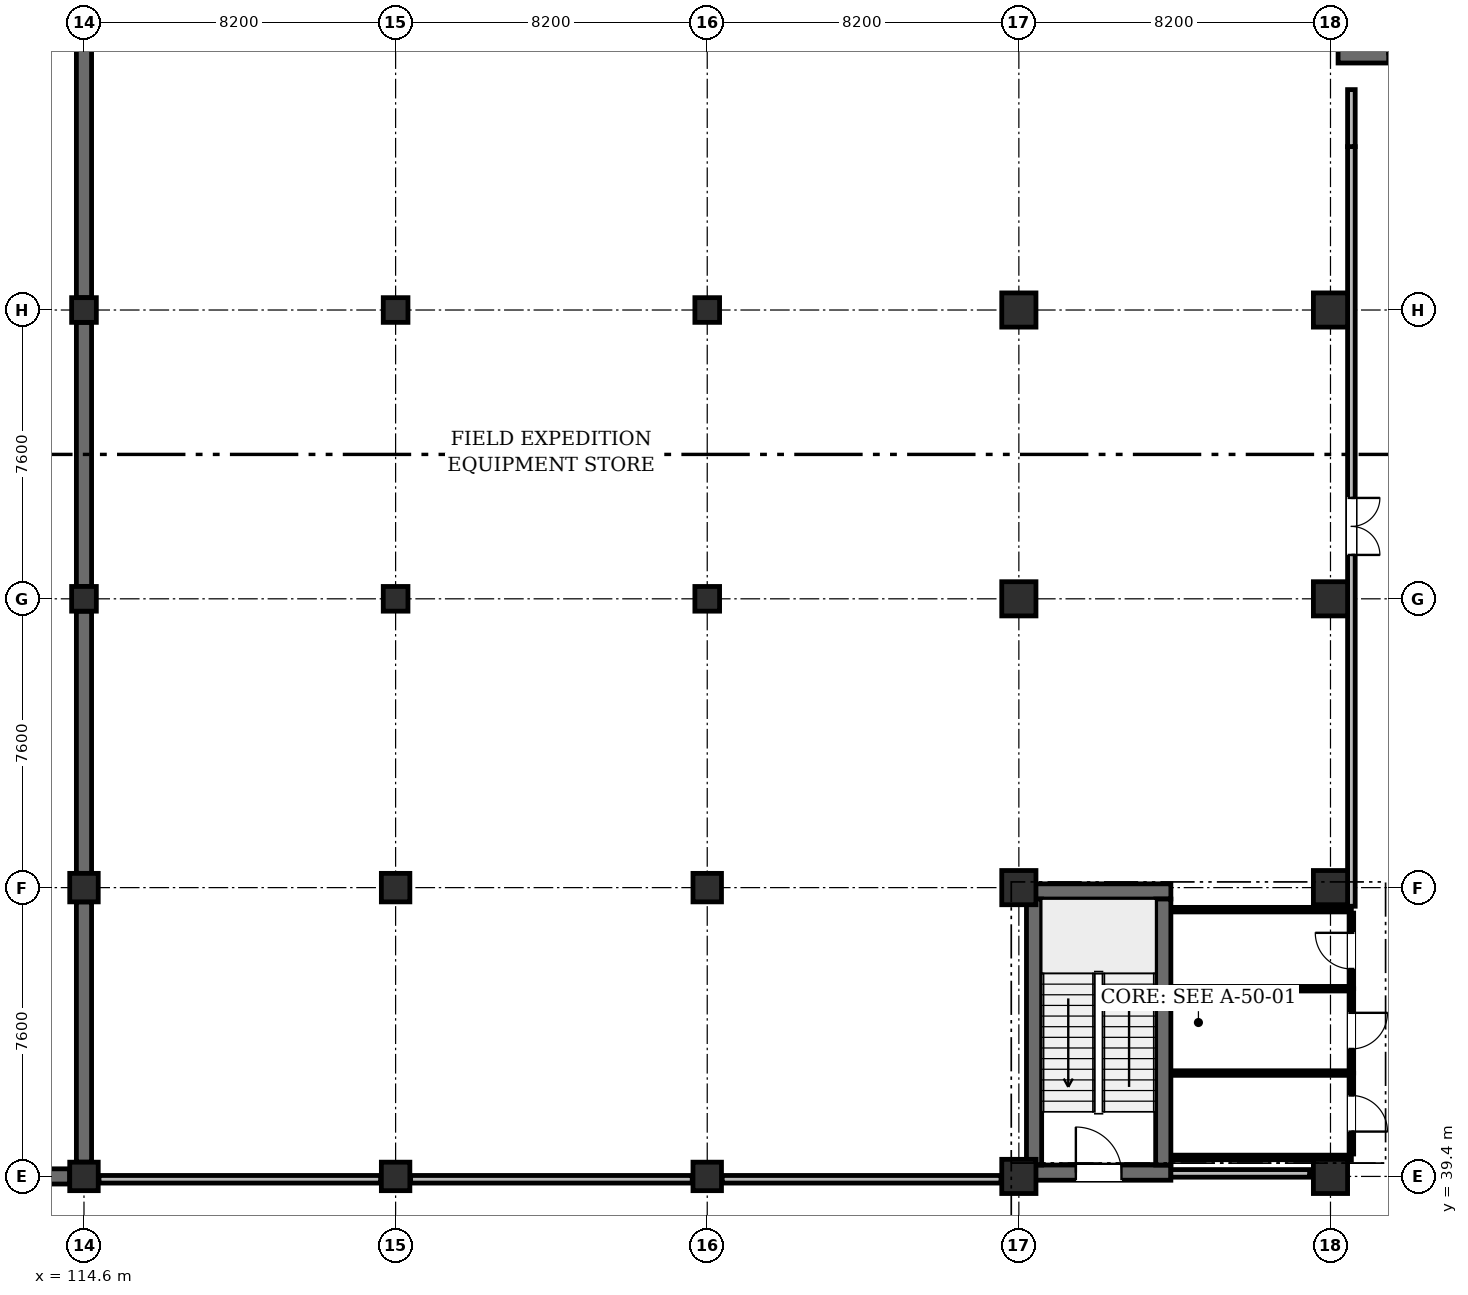
"""IFC4 building model, lengths in metres.
Left out: names, types, materials, properties, quantities, classifications, styles, units other than length and angle.
Written with IfcOpenShell. Run it as: python <this file> out.ifc"""

import sys

from ifc_helpers import new_model, si_unit, direction, frame, frame_2d, origin, origin_2d, place, context, subcontext, project, spatial, rectangle, extrude, element, fill, save


model = new_model("IFC4")
c1 = context("Model", 3, precision=1e-05, world=origin(), true_north=direction((0.0, 1.0)))
c2 = subcontext(c1, "Body", "Model", "MODEL_VIEW")
j1 = project(units=[si_unit("LENGTHUNIT", "METRE"), si_unit("PLANEANGLEUNIT", "RADIAN")], contexts=[c1])
p1 = place(None, origin())
s1 = spatial("IfcSite", under=j1, at=p1, CompositionType="ELEMENT")
p2 = place(p1, origin())
s2 = spatial("IfcBuilding", under=s1, at=p2, CompositionType="ELEMENT")
p3 = place(p2, frame((0.0, 0.0, -4.8)))
s3 = spatial("IfcBuildingStorey", under=s2, at=p3, CompositionType="ELEMENT", Elevation=-4.8)
for number, where, z_axis, x_axis in (
    (1, (114.6, 39.4, 0.0), (0.0, 0.0, 1.0), (1.0, 0.0, 0.0)),
    (2, (114.6, 47.0, 0.0), (0.0, 0.0, 1.0), (1.0, 0.0, 0.0)),
):
    element("IfcColumn", number, at=place(p3, frame(where, z_axis=z_axis, x_axis=x_axis)), inside=s3, PredefinedType="COLUMN", context=c2, shape_type="SweptSolid", body=[
        extrude(rectangle(XDim=0.75, YDim=0.75, at=origin_2d()), origin(), (0.0, 0.0, 1.0), 4.46),
    ])
for number, where, z_axis, x_axis in (
    (3, (114.6, 54.6, 0.0), (0.0, 0.0, 1.0), (1.0, 0.0, 0.0)),
    (4, (114.6, 62.2, 0.0), (0.0, 0.0, 1.0), (1.0, 0.0, 0.0)),
):
    element("IfcColumn", number, at=place(p3, frame(where, z_axis=z_axis, x_axis=x_axis)), inside=s3, PredefinedType="COLUMN", context=c2, shape_type="SweptSolid", body=[
        extrude(rectangle(XDim=0.65, YDim=0.65, at=origin_2d()), origin(), (0.0, 0.0, 1.0), 4.46),
    ])
for number, where, z_axis, x_axis in (
    (5, (122.8, 39.4, 0.0), (0.0, 0.0, 1.0), (1.0, 0.0, 0.0)),
    (6, (122.8, 47.0, 0.0), (0.0, 0.0, 1.0), (1.0, 0.0, 0.0)),
):
    element("IfcColumn", number, at=place(p3, frame(where, z_axis=z_axis, x_axis=x_axis)), inside=s3, PredefinedType="COLUMN", context=c2, shape_type="SweptSolid", body=[
        extrude(rectangle(XDim=0.75, YDim=0.75, at=origin_2d()), origin(), (0.0, 0.0, 1.0), 4.46),
    ])
for number, where, z_axis, x_axis in (
    (7, (122.8, 54.6, 0.0), (0.0, 0.0, 1.0), (1.0, 0.0, 0.0)),
    (8, (122.8, 62.2, 0.0), (0.0, 0.0, 1.0), (1.0, 0.0, 0.0)),
):
    element("IfcColumn", number, at=place(p3, frame(where, z_axis=z_axis, x_axis=x_axis)), inside=s3, PredefinedType="COLUMN", context=c2, shape_type="SweptSolid", body=[
        extrude(rectangle(XDim=0.65, YDim=0.65, at=origin_2d()), origin(), (0.0, 0.0, 1.0), 4.46),
    ])
for number, where, z_axis, x_axis in (
    (9, (131.0, 39.4, 0.0), (0.0, 0.0, 1.0), (1.0, 0.0, 0.0)),
    (10, (131.0, 47.0, 0.0), (0.0, 0.0, 1.0), (1.0, 0.0, 0.0)),
):
    element("IfcColumn", number, at=place(p3, frame(where, z_axis=z_axis, x_axis=x_axis)), inside=s3, PredefinedType="COLUMN", context=c2, shape_type="SweptSolid", body=[
        extrude(rectangle(XDim=0.75, YDim=0.75, at=origin_2d()), origin(), (0.0, 0.0, 1.0), 4.46),
    ])
for number, where, z_axis, x_axis in (
    (11, (131.0, 54.6, 0.0), (0.0, 0.0, 1.0), (1.0, 0.0, 0.0)),
    (12, (131.0, 62.2, 0.0), (0.0, 0.0, 1.0), (1.0, 0.0, 0.0)),
):
    element("IfcColumn", number, at=place(p3, frame(where, z_axis=z_axis, x_axis=x_axis)), inside=s3, PredefinedType="COLUMN", context=c2, shape_type="SweptSolid", body=[
        extrude(rectangle(XDim=0.65, YDim=0.65, at=origin_2d()), origin(), (0.0, 0.0, 1.0), 4.46),
    ])
for number, where, z_axis, x_axis in (
    (13, (139.2, 39.4, 0.0), (0.0, 0.0, 1.0), (1.0, 0.0, 0.0)),
    (14, (139.2, 47.0, 0.0), (0.0, 0.0, 1.0), (1.0, 0.0, 0.0)),
    (15, (139.2, 54.6, 0.0), (0.0, 0.0, 1.0), (1.0, 0.0, 0.0)),
    (16, (139.2, 62.2, 0.0), (0.0, 0.0, 1.0), (1.0, 0.0, 0.0)),
    (17, (147.4, 39.4, 0.0), (0.0, 0.0, 1.0), (1.0, 0.0, 0.0)),
    (18, (147.4, 47.0, 0.0), (0.0, 0.0, 1.0), (1.0, 0.0, 0.0)),
    (19, (147.4, 54.6, 0.0), (0.0, 0.0, 1.0), (1.0, 0.0, 0.0)),
    (20, (147.4, 62.2, 0.0), (0.0, 0.0, 1.0), (1.0, 0.0, 0.0)),
):
    element("IfcColumn", number, at=place(p3, frame(where, z_axis=z_axis, x_axis=x_axis)), inside=s3, PredefinedType="COLUMN", context=c2, shape_type="SweptSolid", body=[
        extrude(rectangle(XDim=0.9, YDim=0.9, at=origin_2d()), origin(), (0.0, 0.0, 1.0), 4.46),
    ])
p4 = place(p3, frame((106.725, 39.4, 0.0), z_axis=(0.0, 0.0, 1.0), x_axis=(1.0, 0.0, 0.0)))
e21 = element("IfcWall", 21, at=p4, inside=s3, PredefinedType="SOLIDWALL", context=c2, shape_type="SweptSolid", body=[
    extrude(rectangle(XDim=7.5, YDim=0.4, at=frame_2d((3.75, 0.0))), origin(), (0.0, 0.0, 1.0), 4.46),
])
p5 = place(p3, frame((114.6, 39.775, 0.0), z_axis=(0.0, 0.0, 1.0), x_axis=(0.0, 1.0, 0.0)))
e22 = element("IfcWall", 22, at=p5, inside=s3, PredefinedType="SOLIDWALL", context=c2, shape_type="SweptSolid", body=[
    extrude(rectangle(XDim=6.85, YDim=0.4, at=frame_2d((3.425, 0.0))), origin(), (0.0, 0.0, 1.0), 4.46),
])
p6 = place(p3, frame((114.6, 47.375, 0.0), z_axis=(0.0, 0.0, 1.0), x_axis=(0.0, 1.0, 0.0)))
e23 = element("IfcWall", 23, at=p6, inside=s3, PredefinedType="SOLIDWALL", context=c2, shape_type="SweptSolid", body=[
    extrude(rectangle(XDim=6.9, YDim=0.4, at=frame_2d((3.45, 0.0))), origin(), (0.0, 0.0, 1.0), 4.46),
])
p7 = place(p3, frame((114.6, 54.925, 0.0), z_axis=(0.0, 0.0, 1.0), x_axis=(0.0, 1.0, 0.0)))
e24 = element("IfcWall", 24, at=p7, inside=s3, PredefinedType="SOLIDWALL", context=c2, shape_type="SweptSolid", body=[
    extrude(rectangle(XDim=6.95, YDim=0.4, at=frame_2d((3.475, 0.0))), origin(), (0.0, 0.0, 1.0), 4.46),
])
p8 = place(p3, frame((114.6, 62.525, 0.0), z_axis=(0.0, 0.0, 1.0), x_axis=(0.0, 1.0, 0.0)))
e25 = element("IfcWall", 25, at=p8, inside=s3, PredefinedType="SOLIDWALL", context=c2, shape_type="SweptSolid", body=[
    extrude(rectangle(XDim=6.95, YDim=0.4, at=frame_2d((3.475, 0.0))), origin(), (0.0, 0.0, 1.0), 4.46),
])
p9 = place(p3, frame((139.4, 39.5, 0.0), z_axis=(0.0, 0.0, 1.0), x_axis=(1.0, 0.0, 0.0)))
e26 = element("IfcWall", 26, at=p9, inside=s3, PredefinedType="SHEAR", context=c2, shape_type="SweptSolid", body=[
    extrude(rectangle(XDim=3.8, YDim=0.4, at=frame_2d((1.9, 0.0))), origin(), (0.0, 0.0, 1.0), 4.46),
])
p10 = place(p9, frame((1.3, 0.0, 0.0)))
e27 = element("IfcOpeningElement", 27, at=p10, cuts=e26, PredefinedType="OPENING", context=c2, shape_type="SweptSolid", body=[
    extrude(rectangle(XDim=1.2, YDim=2.2, at=frame_2d((0.6, 1.1))), frame((0.0, 0.212, 0.0), z_axis=(0.0, -1.0, 0.0), x_axis=(1.0, 0.0, 0.0)), (0.0, 0.0, 1.0), 0.424),
])
p11 = place(p3, frame((139.4, 46.9, 0.0), z_axis=(0.0, 0.0, 1.0), x_axis=(1.0, 0.0, 0.0)))
e28 = element("IfcWall", 28, at=p11, inside=s3, PredefinedType="SHEAR", context=c2, shape_type="SweptSolid", body=[
    extrude(rectangle(XDim=3.8, YDim=0.4, at=frame_2d((1.9, 0.0))), origin(), (0.0, 0.0, 1.0), 4.46),
])
for number, where, z_axis, x_axis in (
    (29, (139.6, 39.7, 0.0), (0.0, 0.0, 1.0), (0.0, 1.0, 0.0)),
    (30, (143.0, 39.7, 0.0), (0.0, 0.0, 1.0), (0.0, 1.0, 0.0)),
):
    element("IfcWall", number, at=place(p3, frame(where, z_axis=z_axis, x_axis=x_axis)), inside=s3, PredefinedType="SHEAR", context=c2, shape_type="SweptSolid", body=[
        extrude(rectangle(XDim=7.0, YDim=0.4, at=frame_2d((3.5, 0.0))), origin(), (0.0, 0.0, 1.0), 4.46),
    ])
p12 = place(p3, frame((147.6, 68.9, 0.0), z_axis=(0.0, 0.0, 1.0), x_axis=(1.0, 0.0, 0.0)))
e31 = element("IfcWall", 31, at=p12, inside=s3, PredefinedType="SHEAR", context=c2, shape_type="SweptSolid", body=[
    extrude(rectangle(XDim=3.8, YDim=0.4, at=frame_2d((1.9, 0.0))), origin(), (0.0, 0.0, 1.0), 4.46),
])
p13 = place(p12, frame((1.3, 0.0, 0.0)))
e32 = element("IfcOpeningElement", 32, at=p13, cuts=e31, PredefinedType="OPENING", context=c2, shape_type="SweptSolid", body=[
    extrude(rectangle(XDim=1.2, YDim=2.2, at=frame_2d((0.6, 1.1))), frame((0.0, 0.212, 0.0), z_axis=(0.0, -1.0, 0.0), x_axis=(1.0, 0.0, 0.0)), (0.0, 0.0, 1.0), 0.424),
])
for number, where, z_axis, x_axis in (
    (33, (143.23, 39.9, 0.0), (0.0, 0.0, 1.0), (1.0, 0.0, 0.0)),
    (34, (143.23, 46.42, 0.0), (0.0, 0.0, 1.0), (1.0, 0.0, 0.0)),
):
    element("IfcWall", number, at=place(p3, frame(where, z_axis=z_axis, x_axis=x_axis)), inside=s3, PredefinedType="PARTITIONING", context=c2, shape_type="SweptSolid", body=[
        extrude(rectangle(XDim=4.72, YDim=0.12, at=frame_2d((2.36, 0.0))), origin(), (0.0, 0.0, 1.0), 4.405),
    ])
p14 = place(p3, frame((143.23, 42.12, 0.0), z_axis=(0.0, 0.0, 1.0), x_axis=(1.0, 0.0, 0.0)))
e35 = element("IfcWall", 35, at=p14, inside=s3, PredefinedType="PARTITIONING", context=c2, shape_type="SweptSolid", body=[
    extrude(rectangle(XDim=4.72, YDim=0.12, at=frame_2d((2.36, 0.0))), origin(), (0.0, 0.0, 1.0), 3.935),
])
p15 = place(p3, frame((147.95, 42.12, 0.0), z_axis=(0.0, 0.0, 1.0), x_axis=(0.0, -1.0, 0.0)))
e36 = element("IfcWall", 36, at=p15, inside=s3, PredefinedType="PARTITIONING", context=c2, shape_type="SweptSolid", body=[
    extrude(rectangle(XDim=2.13, YDim=0.12, at=frame_2d((1.065, 0.0))), origin(), (0.0, 0.0, 1.0), 4.405),
])
p16 = place(p15, frame((0.59, 0.0, 0.0)))
e37 = element("IfcOpeningElement", 37, at=p16, cuts=e36, PredefinedType="OPENING", context=c2, shape_type="SweptSolid", body=[
    extrude(rectangle(XDim=0.95, YDim=2.15, at=frame_2d((0.475, 1.075))), frame((0.0, 0.072, 0.0), z_axis=(0.0, -1.0, 0.0), x_axis=(1.0, 0.0, 0.0)), (0.0, 0.0, 1.0), 0.144),
])
p17 = place(p3, frame((143.23, 44.34, 0.0), z_axis=(0.0, 0.0, 1.0), x_axis=(1.0, 0.0, 0.0)))
e38 = element("IfcWall", 38, at=p17, inside=s3, PredefinedType="PARTITIONING", context=c2, shape_type="SweptSolid", body=[
    extrude(rectangle(XDim=4.72, YDim=0.12, at=frame_2d((2.36, 0.0))), origin(), (0.0, 0.0, 1.0), 3.885),
])
p18 = place(p3, frame((147.95, 44.34, 0.0), z_axis=(0.0, 0.0, 1.0), x_axis=(0.0, -1.0, 0.0)))
e39 = element("IfcWall", 39, at=p18, inside=s3, PredefinedType="PARTITIONING", context=c2, shape_type="SweptSolid", body=[
    extrude(rectangle(XDim=2.22, YDim=0.12, at=frame_2d((1.11, 0.0))), origin(), (0.0, 0.0, 1.0), 4.405),
])
p19 = place(p18, frame((0.635, 0.0, 0.0)))
e40 = element("IfcOpeningElement", 40, at=p19, cuts=e39, PredefinedType="OPENING", context=c2, shape_type="SweptSolid", body=[
    extrude(rectangle(XDim=0.95, YDim=2.15, at=frame_2d((0.475, 1.075))), frame((0.0, 0.072, 0.0), z_axis=(0.0, -1.0, 0.0), x_axis=(1.0, 0.0, 0.0)), (0.0, 0.0, 1.0), 0.144),
])
p20 = place(p3, frame((147.95, 46.33, 0.0), z_axis=(0.0, 0.0, 1.0), x_axis=(0.0, -1.0, 0.0)))
e41 = element("IfcWall", 41, at=p20, inside=s3, PredefinedType="PARTITIONING", context=c2, shape_type="SweptSolid", body=[
    extrude(rectangle(XDim=1.99, YDim=0.12, at=frame_2d((0.995, 0.0))), origin(), (0.0, 0.0, 1.0), 4.405),
])
p21 = place(p20, frame((0.52, 0.0, 0.0)))
e42 = element("IfcOpeningElement", 42, at=p21, cuts=e41, PredefinedType="OPENING", context=c2, shape_type="SweptSolid", body=[
    extrude(rectangle(XDim=0.95, YDim=2.15, at=frame_2d((0.475, 1.075))), frame((0.0, 0.072, 0.0), z_axis=(0.0, -1.0, 0.0), x_axis=(1.0, 0.0, 0.0)), (0.0, 0.0, 1.0), 0.144),
])
p22 = place(p3, frame((143.2, 39.48, 0.0), z_axis=(0.0, 0.0, 1.0), x_axis=(1.0, 0.0, 0.0)))
e43 = element("IfcWall", 43, at=p22, inside=s3, PredefinedType="PARTITIONING", context=c2, shape_type="SweptSolid", body=[
    extrude(rectangle(XDim=3.65, YDim=0.2, at=frame_2d((1.825, 0.0))), origin(), (0.0, 0.0, 1.0), 3.595),
])
p23 = place(p3, frame((147.95, 46.51, 0.0), z_axis=(0.0, 0.0, 1.0), x_axis=(0.0, 1.0, 0.0)))
e44 = element("IfcWall", 44, at=p23, inside=s3, PredefinedType="PARTITIONING", context=c2, shape_type="SweptSolid", body=[
    extrude(rectangle(XDim=19.99, YDim=0.2, at=frame_2d((9.995, 0.0))), origin(), (0.0, 0.0, 1.0), 4.405),
])
p24 = place(p23, frame((9.245, 0.0, 0.0)))
e45 = element("IfcOpeningElement", 45, at=p24, cuts=e44, PredefinedType="OPENING", context=c2, shape_type="SweptSolid", body=[
    extrude(rectangle(XDim=1.5, YDim=2.2, at=frame_2d((0.75, 1.1))), frame((0.0, 0.112, 0.0), z_axis=(0.0, -1.0, 0.0), x_axis=(1.0, 0.0, 0.0)), (0.0, 0.0, 1.0), 0.224),
])
p25 = place(p3, frame((147.95, 66.5, 0.0), z_axis=(0.0, 0.0, 1.0), x_axis=(0.0, 1.0, 0.0)))
e46 = element("IfcWall", 46, at=p25, inside=s3, PredefinedType="PARTITIONING", context=c2, shape_type="SweptSolid", body=[
    extrude(rectangle(XDim=1.5, YDim=0.2, at=frame_2d((0.75, 0.0))), origin(), (0.0, 0.0, 1.0), 4.405),
])
for number, where, z_axis, x_axis in (
    (47, (114.995, 39.325, 0.0), (0.0, 0.0, 1.0), (1.0, 0.0, 0.0)),
    (48, (123.195, 39.325, 0.0), (0.0, 0.0, 1.0), (1.0, 0.0, 0.0)),
):
    element("IfcWall", number, at=place(p3, frame(where, z_axis=z_axis, x_axis=x_axis)), inside=s3, PredefinedType="PARTITIONING", context=c2, shape_type="SweptSolid", body=[
        extrude(rectangle(XDim=7.41, YDim=0.2, at=frame_2d((3.705, 0.0))), origin(), (0.0, 0.0, 1.0), 3.595),
    ])
p26 = place(p3, frame((131.395, 39.325, 0.0), z_axis=(0.0, 0.0, 1.0), x_axis=(1.0, 0.0, 0.0)))
e49 = element("IfcWall", 49, at=p26, inside=s3, PredefinedType="PARTITIONING", context=c2, shape_type="SweptSolid", body=[
    extrude(rectangle(XDim=7.335, YDim=0.2, at=frame_2d((3.667, 0.0))), origin(), (0.0, 0.0, 1.0), 3.595),
])
p27 = place(p10, origin())
e50 = element("IfcDoor", 50, at=p27, inside=s3, OperationType="SINGLE_SWING_LEFT", PredefinedType="DOOR", context=c2, shape_type="SweptSolid", body=[
    extrude(rectangle(XDim=1.2, YDim=2.2, at=frame_2d((0.6, 1.1))), frame((0.0, 0.025, 0.0), z_axis=(0.0, -1.0, 0.0), x_axis=(1.0, 0.0, 0.0)), (0.0, 0.0, 1.0), 0.05),
])
fill(e27, e50)
p28 = place(p13, origin())
e51 = element("IfcDoor", 51, at=p28, inside=s3, OperationType="SINGLE_SWING_LEFT", PredefinedType="DOOR", context=c2, shape_type="SweptSolid", body=[
    extrude(rectangle(XDim=1.2, YDim=2.2, at=frame_2d((0.6, 1.1))), frame((0.0, 0.025, 0.0), z_axis=(0.0, -1.0, 0.0), x_axis=(1.0, 0.0, 0.0)), (0.0, 0.0, 1.0), 0.05),
])
fill(e32, e51)
p29 = place(p16, origin())
e52 = element("IfcDoor", 52, at=p29, inside=s3, OperationType="SINGLE_SWING_RIGHT", PredefinedType="DOOR", context=c2, shape_type="SweptSolid", body=[
    extrude(rectangle(XDim=0.95, YDim=2.15, at=frame_2d((0.475, 1.075))), frame((0.0, 0.025, 0.0), z_axis=(0.0, -1.0, 0.0), x_axis=(1.0, 0.0, 0.0)), (0.0, 0.0, 1.0), 0.05),
])
fill(e37, e52)
p30 = place(p19, origin())
e53 = element("IfcDoor", 53, at=p30, inside=s3, OperationType="SINGLE_SWING_LEFT", PredefinedType="DOOR", context=c2, shape_type="SweptSolid", body=[
    extrude(rectangle(XDim=0.95, YDim=2.15, at=frame_2d((0.475, 1.075))), frame((0.0, 0.025, 0.0), z_axis=(0.0, -1.0, 0.0), x_axis=(1.0, 0.0, 0.0)), (0.0, 0.0, 1.0), 0.05),
])
fill(e40, e53)
p31 = place(p21, frame((0.95, 0.0, 0.0), z_axis=(0.0, 0.0, 1.0), x_axis=(-1.0, 0.0, 0.0)))
e54 = element("IfcDoor", 54, at=p31, inside=s3, OperationType="SINGLE_SWING_RIGHT", PredefinedType="DOOR", context=c2, shape_type="SweptSolid", body=[
    extrude(rectangle(XDim=0.95, YDim=2.15, at=frame_2d((0.475, 1.075))), frame((0.0, 0.025, 0.0), z_axis=(0.0, -1.0, 0.0), x_axis=(1.0, 0.0, 0.0)), (0.0, 0.0, 1.0), 0.05),
])
fill(e42, e54)
p32 = place(p24, frame((1.5, 0.0, 0.0), z_axis=(0.0, 0.0, 1.0), x_axis=(-1.0, 0.0, 0.0)))
e55 = element("IfcDoor", 55, at=p32, inside=s3, OperationType="DOUBLE_DOOR_SINGLE_SWING", PredefinedType="DOOR", context=c2, shape_type="SweptSolid", body=[
    extrude(rectangle(XDim=1.5, YDim=2.2, at=frame_2d((0.75, 1.1))), frame((0.0, 0.025, 0.0), z_axis=(0.0, -1.0, 0.0), x_axis=(1.0, 0.0, 0.0)), (0.0, 0.0, 1.0), 0.05),
])
fill(e45, e55)
save(model, sys.argv[1])
